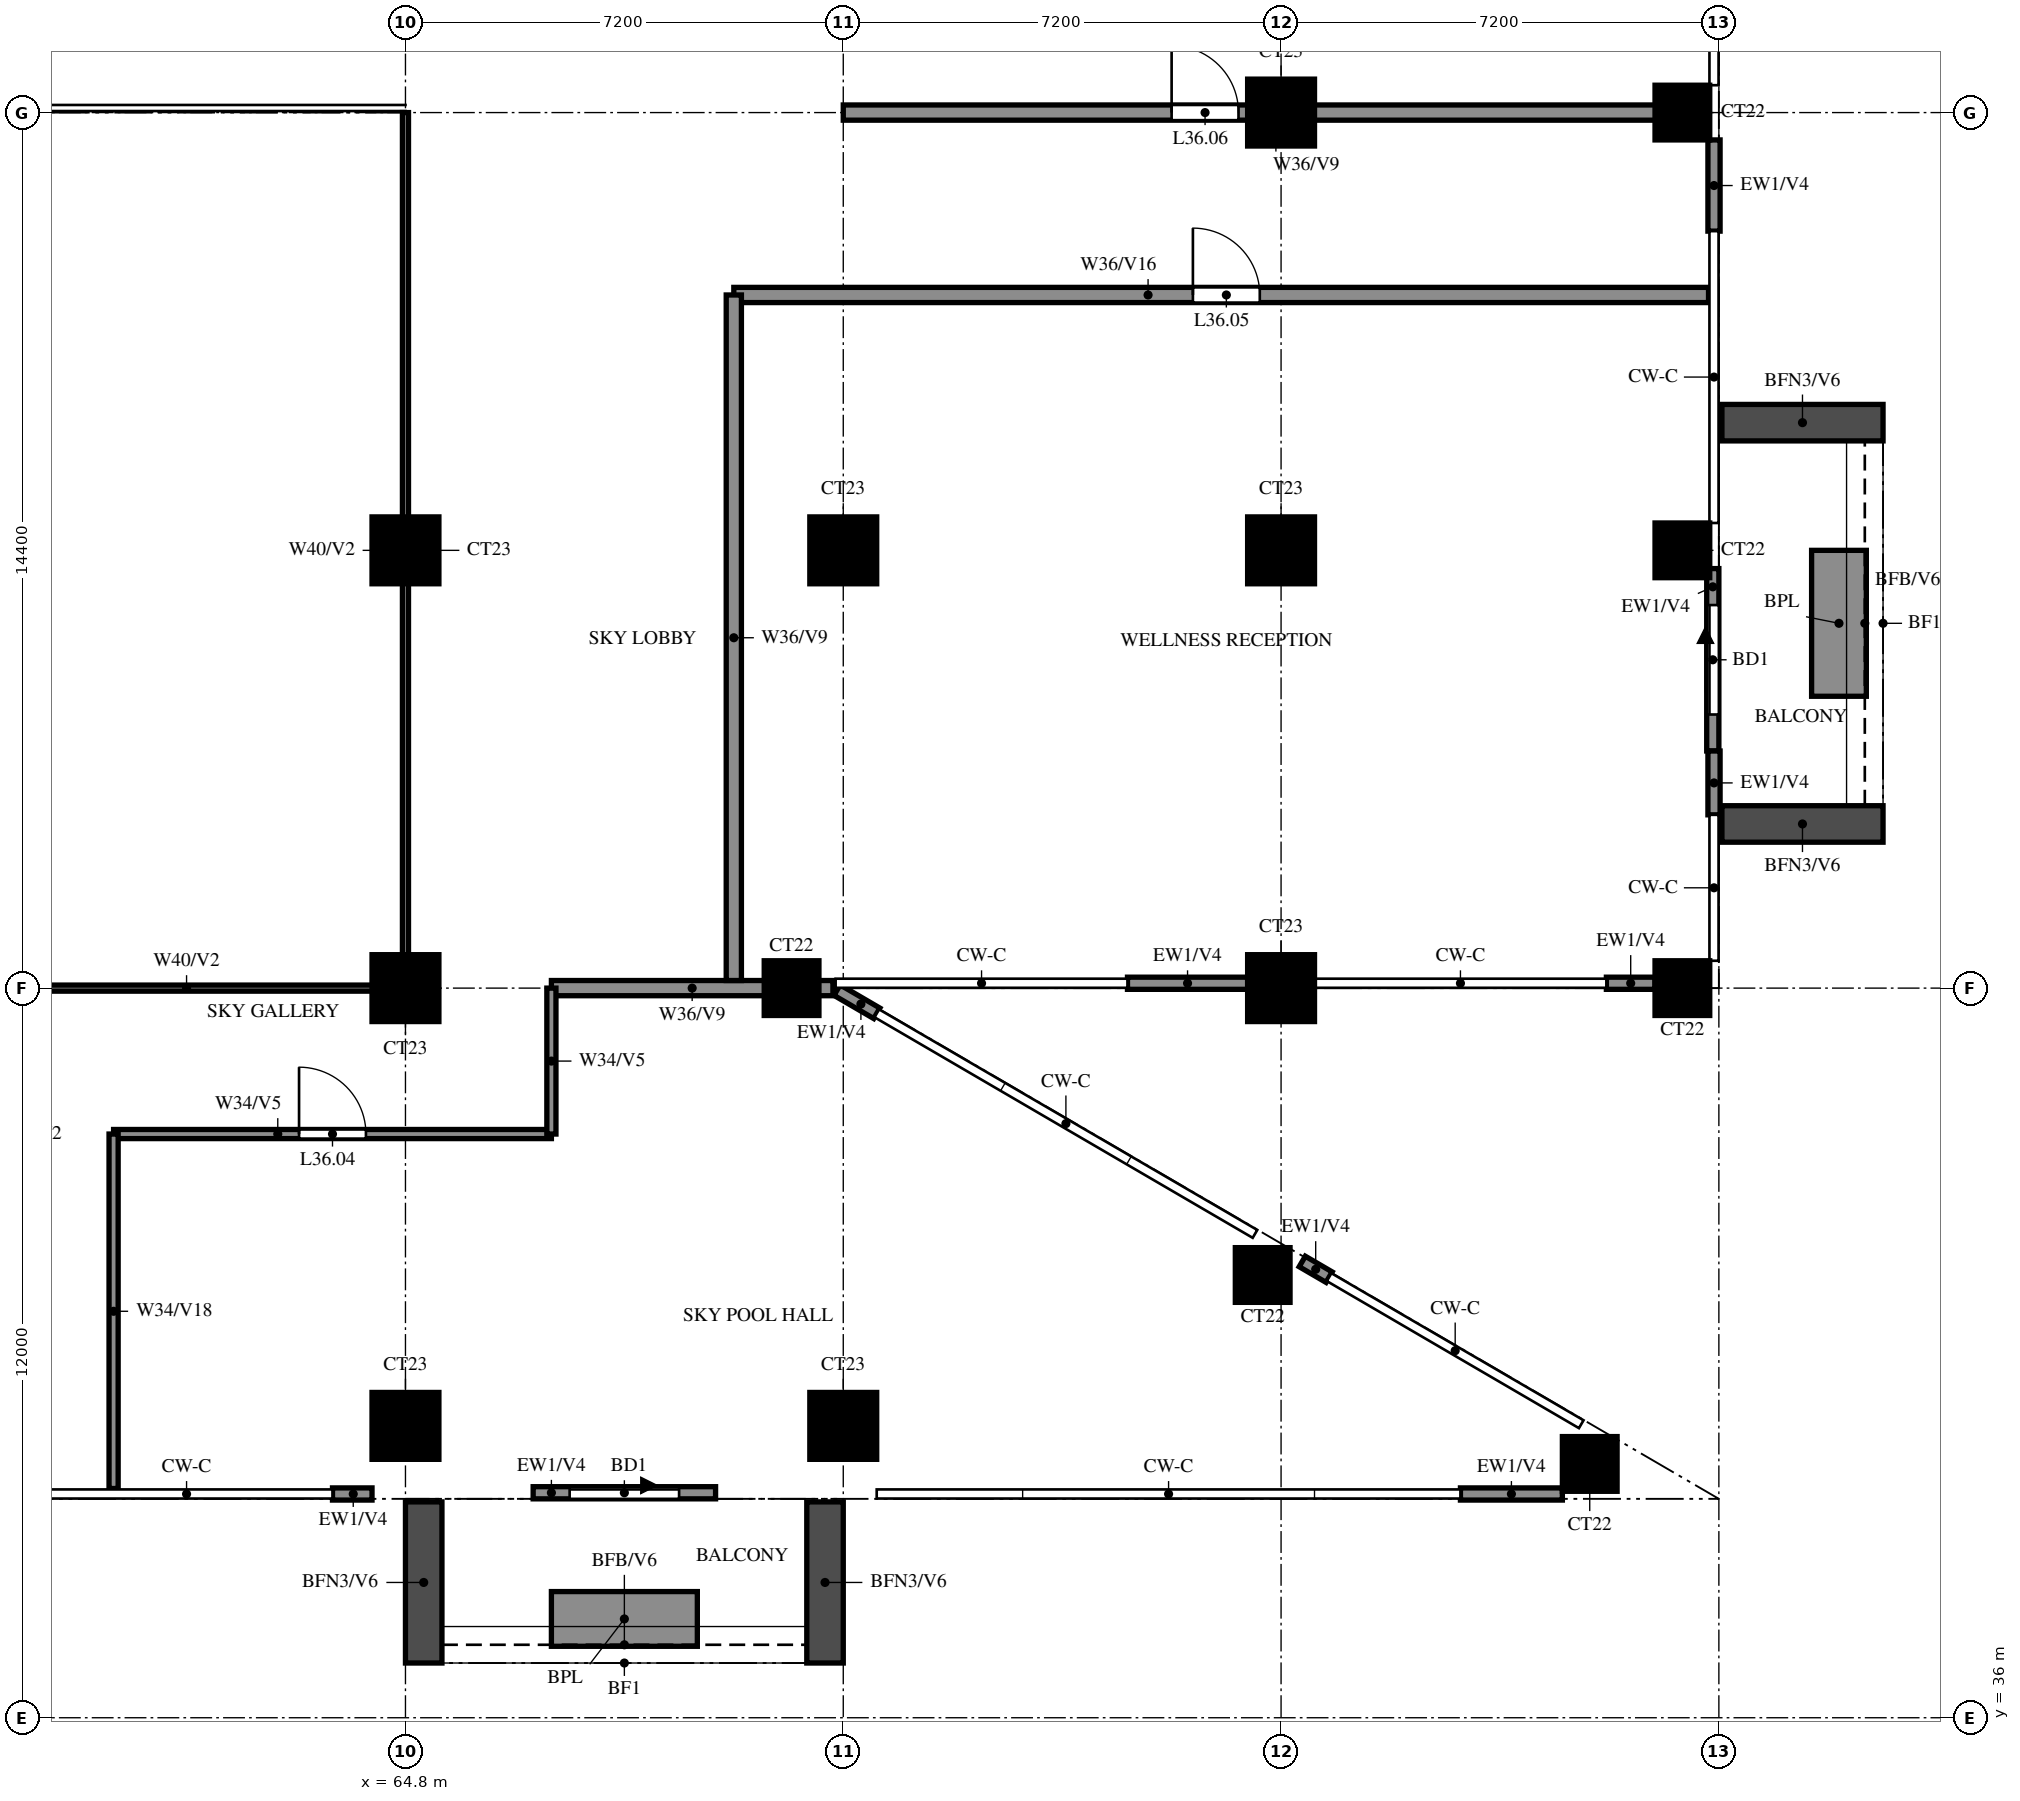
"""IFC4 building model, lengths in metres.
Left out: names, types, materials, properties, quantities, classifications, styles, units other than length and angle.
Written with IfcOpenShell. Run it as: python <this file> out.ifc"""

import sys

from ifc_helpers import new_model, si_unit, direction, frame, frame_2d, origin, origin_2d, place, context, subcontext, project, spatial, rectangle, extrude, source, transform, mapped, element, fill, save


model = new_model("IFC4")
c1 = context("Model", 3, precision=1e-05, world=origin(), true_north=direction((0.0, 1.0)))
c2 = subcontext(c1, "Body", "Model", "MODEL_VIEW")
j1 = project(units=[si_unit("LENGTHUNIT", "METRE"), si_unit("PLANEANGLEUNIT", "RADIAN")], contexts=[c1])
p1 = place(None, origin())
s1 = spatial("IfcSite", under=j1, at=p1, CompositionType="ELEMENT")
p2 = place(p1, origin())
s2 = spatial("IfcBuilding", under=s1, at=p2, CompositionType="ELEMENT")
p3 = place(p2, frame((0.0, 0.0, 137.5)))
s3 = spatial("IfcBuildingStorey", under=s2, at=p3, CompositionType="ELEMENT", Elevation=137.5)
m1 = source(origin(), c2, "Body", "SweptSolid", [
    extrude(rectangle(XDim=0.9, YDim=0.9, at=origin_2d()), origin(), (0.0, 0.0, 1.0), 5.2),
])
p4 = place(p3, frame((84.276, 40.174, 0.0), z_axis=(0.0, 0.0, 1.0), x_axis=(1.0, 0.0, 0.0)))
e1 = element("IfcColumn", 1, at=p4, inside=s3, PredefinedType="COLUMN", context=c2, shape_type="MappedRepresentation", body=[
    mapped(m1, transform((0.0, 0.0, 0.0))),
])
m2 = source(origin(), c2, "Body", "SweptSolid", [
    extrude(rectangle(XDim=1.1, YDim=1.1, at=origin_2d()), origin(), (0.0, 0.0, 1.0), 5.2),
])
for number, where, z_axis, x_axis in (
    (2, (64.8, 40.8, 0.0), (0.0, 0.0, 1.0), (1.0, 0.0, 0.0)),
    (3, (72.0, 40.8, 0.0), (0.0, 0.0, 1.0), (1.0, 0.0, 0.0)),
):
    element("IfcColumn", number, at=place(p3, frame(where, z_axis=z_axis, x_axis=x_axis)), inside=s3, PredefinedType="COLUMN", context=c2, shape_type="MappedRepresentation", body=[
        mapped(m2, transform((0.0, 0.0, 0.0))),
    ])
p5 = place(p3, frame((78.898, 43.282, 0.0), z_axis=(0.0, 0.0, 1.0), x_axis=(1.0, 0.0, 0.0)))
e4 = element("IfcColumn", 4, at=p5, inside=s3, PredefinedType="COLUMN", context=c2, shape_type="MappedRepresentation", body=[
    mapped(m1, transform((0.0, 0.0, 0.0))),
])
p6 = place(p3, frame((64.8, 48.0, 0.0), z_axis=(0.0, 0.0, 1.0), x_axis=(1.0, 0.0, 0.0)))
e5 = element("IfcColumn", 5, at=p6, inside=s3, PredefinedType="COLUMN", context=c2, shape_type="MappedRepresentation", body=[
    mapped(m2, transform((0.0, 0.0, 0.0))),
])
p7 = place(p3, frame((71.15, 48.0, 0.0), z_axis=(0.0, 0.0, 1.0), x_axis=(1.0, 0.0, 0.0)))
e6 = element("IfcColumn", 6, at=p7, inside=s3, PredefinedType="COLUMN", context=c2, shape_type="MappedRepresentation", body=[
    mapped(m1, transform((0.0, 0.0, 0.0))),
])
p8 = place(p3, frame((79.2, 48.0, 0.0), z_axis=(0.0, 0.0, 1.0), x_axis=(1.0, 0.0, 0.0)))
e7 = element("IfcColumn", 7, at=p8, inside=s3, PredefinedType="COLUMN", context=c2, shape_type="MappedRepresentation", body=[
    mapped(m2, transform((0.0, 0.0, 0.0))),
])
p9 = place(p3, frame((85.8, 48.0, 0.0), z_axis=(0.0, 0.0, 1.0), x_axis=(1.0, 0.0, 0.0)))
e8 = element("IfcColumn", 8, at=p9, inside=s3, PredefinedType="COLUMN", context=c2, shape_type="MappedRepresentation", body=[
    mapped(m1, transform((0.0, 0.0, 0.0))),
])
for number, where, z_axis, x_axis in (
    (9, (64.8, 55.2, 0.0), (0.0, 0.0, 1.0), (1.0, 0.0, 0.0)),
    (10, (72.0, 55.2, 0.0), (0.0, 0.0, 1.0), (1.0, 0.0, 0.0)),
    (11, (79.2, 55.2, 0.0), (0.0, 0.0, 1.0), (1.0, 0.0, 0.0)),
):
    element("IfcColumn", number, at=place(p3, frame(where, z_axis=z_axis, x_axis=x_axis)), inside=s3, PredefinedType="COLUMN", context=c2, shape_type="MappedRepresentation", body=[
        mapped(m2, transform((0.0, 0.0, 0.0))),
    ])
p10 = place(p3, frame((85.8, 55.2, 0.0), z_axis=(0.0, 0.0, 1.0), x_axis=(1.0, 0.0, 0.0)))
e12 = element("IfcColumn", 12, at=p10, inside=s3, PredefinedType="COLUMN", context=c2, shape_type="MappedRepresentation", body=[
    mapped(m1, transform((0.0, 0.0, 0.0))),
])
p11 = place(p3, frame((79.2, 62.4, 0.0), z_axis=(0.0, 0.0, 1.0), x_axis=(1.0, 0.0, 0.0)))
e13 = element("IfcColumn", 13, at=p11, inside=s3, PredefinedType="COLUMN", context=c2, shape_type="MappedRepresentation", body=[
    mapped(m2, transform((0.0, 0.0, 0.0))),
])
p12 = place(p3, frame((85.8, 62.4, 0.0), z_axis=(0.0, 0.0, 1.0), x_axis=(1.0, 0.0, 0.0)))
e14 = element("IfcColumn", 14, at=p12, inside=s3, PredefinedType="COLUMN", context=c2, shape_type="MappedRepresentation", body=[
    mapped(m1, transform((0.0, 0.0, 0.0))),
])
p13 = place(p3, frame((79.99, 43.246, 0.0), z_axis=(0.0, 0.0, 1.0), x_axis=(-0.863865392601, 0.503722724786, 0.0)))
e15 = element("IfcWall", 15, at=p13, inside=s3, PredefinedType="SOLIDWALL", context=c2, shape_type="SweptSolid", body=[
    extrude(rectangle(XDim=0.512, YDim=0.2, at=frame_2d((0.256, 0.0))), origin(), (0.0, 0.0, 1.0), 5.2),
])
p14 = place(p3, frame((72.552, 47.585, 0.0), z_axis=(0.0, 0.0, 1.0), x_axis=(-0.863743817622, 0.503931163473, 0.0)))
e16 = element("IfcWall", 16, at=p14, inside=s3, PredefinedType="SOLIDWALL", context=c2, shape_type="SweptSolid", body=[
    extrude(rectangle(XDim=0.757, YDim=0.2, at=frame_2d((0.379, 0.0))), origin(), (0.0, 0.0, 1.0), 5.2),
])
p15 = place(p3, frame((76.674, 48.08, 0.0), z_axis=(0.0, 0.0, 1.0), x_axis=(1.0, 0.0, 0.0)))
e17 = element("IfcWall", 17, at=p15, inside=s3, PredefinedType="SOLIDWALL", context=c2, shape_type="SweptSolid", body=[
    extrude(rectangle(XDim=1.976, YDim=0.2, at=frame_2d((0.988, 0.0))), origin(), (0.0, 0.0, 1.0), 5.2),
])
p16 = place(p3, frame((84.55, 48.08, 0.0), z_axis=(0.0, 0.0, 1.0), x_axis=(1.0, 0.0, 0.0)))
e18 = element("IfcWall", 18, at=p16, inside=s3, PredefinedType="SOLIDWALL", context=c2, shape_type="SweptSolid", body=[
    extrude(rectangle(XDim=0.8, YDim=0.2, at=frame_2d((0.4, 0.0))), origin(), (0.0, 0.0, 1.0), 5.2),
])
p17 = place(p3, frame((86.3, 51.9, 0.0), z_axis=(0.0, 0.0, 1.0), x_axis=(0.0, 1.0, 0.0)))
e19 = element("IfcWall", 19, at=p17, inside=s3, PredefinedType="SOLIDWALL", context=c2, shape_type="SweptSolid", body=[
    extrude(rectangle(XDim=3.0, YDim=0.2, at=frame_2d((1.5, 0.0))), origin(), (0.0, 0.0, 1.0), 5.2),
])
p18 = place(p17, frame((0.6, 0.0, 0.0)))
e20 = element("IfcOpeningElement", 20, at=p18, cuts=e19, PredefinedType="OPENING", context=c2, shape_type="SweptSolid", body=[
    extrude(rectangle(XDim=1.8, YDim=2.4, at=frame_2d((0.9, 1.2))), frame((0.0, 0.11, 0.0), z_axis=(0.0, -1.0, 0.0), x_axis=(1.0, 0.0, 0.0)), (0.0, 0.0, 1.0), 0.22),
])
p19 = place(p3, frame((86.32, 50.85, 0.0), z_axis=(0.0, 0.0, 1.0), x_axis=(0.0, 1.0, 0.0)))
e21 = element("IfcWall", 21, at=p19, inside=s3, PredefinedType="SOLIDWALL", context=c2, shape_type="SweptSolid", body=[
    extrude(rectangle(XDim=1.05, YDim=0.2, at=frame_2d((0.525, 0.0))), origin(), (0.0, 0.0, 1.0), 5.2),
])
p20 = place(p3, frame((86.32, 60.45, 0.0), z_axis=(0.0, 0.0, 1.0), x_axis=(0.0, 1.0, 0.0)))
e22 = element("IfcWall", 22, at=p20, inside=s3, PredefinedType="SOLIDWALL", context=c2, shape_type="SweptSolid", body=[
    extrude(rectangle(XDim=1.5, YDim=0.2, at=frame_2d((0.75, 0.0))), origin(), (0.0, 0.0, 1.0), 5.2),
])
p21 = place(p3, frame((66.9, 39.7, 0.0), z_axis=(0.0, 0.0, 1.0), x_axis=(1.0, 0.0, 0.0)))
e23 = element("IfcWall", 23, at=p21, inside=s3, PredefinedType="SOLIDWALL", context=c2, shape_type="SweptSolid", body=[
    extrude(rectangle(XDim=3.0, YDim=0.2, at=frame_2d((1.5, 0.0))), origin(), (0.0, 0.0, 1.0), 5.2),
])
p22 = place(p21, frame((0.6, 0.0, 0.0)))
e24 = element("IfcOpeningElement", 24, at=p22, cuts=e23, PredefinedType="OPENING", context=c2, shape_type="SweptSolid", body=[
    extrude(rectangle(XDim=1.8, YDim=2.4, at=frame_2d((0.9, 1.2))), frame((0.0, 0.11, 0.0), z_axis=(0.0, -1.0, 0.0), x_axis=(1.0, 0.0, 0.0)), (0.0, 0.0, 1.0), 0.22),
])
p23 = place(p3, frame((63.6, 39.68, 0.0), z_axis=(0.0, 0.0, 1.0), x_axis=(1.0, 0.0, 0.0)))
e25 = element("IfcWall", 25, at=p23, inside=s3, PredefinedType="SOLIDWALL", context=c2, shape_type="SweptSolid", body=[
    extrude(rectangle(XDim=0.65, YDim=0.2, at=frame_2d((0.325, 0.0))), origin(), (0.0, 0.0, 1.0), 5.2),
])
p24 = place(p3, frame((82.15, 39.68, 0.0), z_axis=(0.0, 0.0, 1.0), x_axis=(1.0, 0.0, 0.0)))
e26 = element("IfcWall", 26, at=p24, inside=s3, PredefinedType="SOLIDWALL", context=c2, shape_type="SweptSolid", body=[
    extrude(rectangle(XDim=1.676, YDim=0.2, at=frame_2d((0.838, 0.0))), origin(), (0.0, 0.0, 1.0), 5.2),
])
for number, where, z_axis, x_axis in (
    (27, (86.45, 50.7, 0.0), (0.0, 0.0, 1.0), (1.0, 0.0, 0.0)),
    (28, (86.45, 57.3, 0.0), (0.0, 0.0, 1.0), (1.0, 0.0, 0.0)),
):
    element("IfcWall", number, at=place(p3, frame(where, z_axis=z_axis, x_axis=x_axis)), inside=s3, PredefinedType="SOLIDWALL", context=c2, shape_type="SweptSolid", body=[
        extrude(rectangle(XDim=2.65, YDim=0.6, at=frame_2d((1.325, 0.0))), origin(), (0.0, 0.0, 1.0), 4.9),
    ])
p25 = place(p3, frame((88.375, 52.8, 0.0), z_axis=(0.0, 0.0, 1.0), x_axis=(0.0, 1.0, 0.0)))
e29 = element("IfcWall", 29, at=p25, inside=s3, PredefinedType="SOLIDWALL", context=c2, shape_type="SweptSolid", body=[
    extrude(rectangle(XDim=2.4, YDim=0.9, at=frame_2d((1.2, 0.0))), origin(), (0.0, 0.0, 1.0), 0.9),
])
for number, where, z_axis, x_axis in (
    (30, (65.1, 39.55, 0.0), (0.0, 0.0, 1.0), (0.0, -1.0, 0.0)),
    (31, (71.7, 39.55, 0.0), (0.0, 0.0, 1.0), (0.0, -1.0, 0.0)),
):
    element("IfcWall", number, at=place(p3, frame(where, z_axis=z_axis, x_axis=x_axis)), inside=s3, PredefinedType="SOLIDWALL", context=c2, shape_type="SweptSolid", body=[
        extrude(rectangle(XDim=2.65, YDim=0.6, at=frame_2d((1.325, 0.0))), origin(), (0.0, 0.0, 1.0), 4.9),
    ])
p26 = place(p3, frame((67.2, 37.625, 0.0), z_axis=(0.0, 0.0, 1.0), x_axis=(1.0, 0.0, 0.0)))
e32 = element("IfcWall", 32, at=p26, inside=s3, PredefinedType="SOLIDWALL", context=c2, shape_type="SweptSolid", body=[
    extrude(rectangle(XDim=2.4, YDim=0.9, at=frame_2d((1.2, 0.0))), origin(), (0.0, 0.0, 1.0), 0.9),
])
p27 = place(p3, frame((60.0, 45.6, 0.0), z_axis=(0.0, 0.0, 1.0), x_axis=(1.0, 0.0, 0.0)))
e33 = element("IfcWall", 33, at=p27, inside=s3, PredefinedType="PARTITIONING", context=c2, shape_type="SweptSolid", body=[
    extrude(rectangle(XDim=7.2, YDim=0.15, at=frame_2d((3.6, 0.0))), origin(), (0.0, 0.0, 1.0), 5.2),
])
p28 = place(p27, frame((3.05, 0.0, 0.0)))
e34 = element("IfcOpeningElement", 34, at=p28, cuts=e33, PredefinedType="OPENING", context=c2, shape_type="SweptSolid", body=[
    extrude(rectangle(XDim=1.1, YDim=2.1, at=frame_2d((0.55, 1.05))), frame((0.0, 0.085, 0.0), z_axis=(0.0, -1.0, 0.0), x_axis=(1.0, 0.0, 0.0)), (0.0, 0.0, 1.0), 0.17),
])
p29 = place(p3, frame((57.6, 48.0, 0.0), z_axis=(0.0, 0.0, 1.0), x_axis=(1.0, 0.0, 0.0)))
e35 = element("IfcWall", 35, at=p29, inside=s3, PredefinedType="PARTITIONING", context=c2, shape_type="SweptSolid", body=[
    extrude(rectangle(XDim=7.2, YDim=0.1, at=frame_2d((3.6, 0.0))), origin(), (0.0, 0.0, 1.0), 4.3),
])
p30 = place(p3, frame((67.2, 48.0, 0.0), z_axis=(0.0, 0.0, 1.0), x_axis=(1.0, 0.0, 0.0)))
e36 = element("IfcWall", 36, at=p30, inside=s3, PredefinedType="SOLIDWALL", context=c2, shape_type="SweptSolid", body=[
    extrude(rectangle(XDim=4.63, YDim=0.25, at=frame_2d((2.315, 0.0))), origin(), (0.0, 0.0, 1.0), 5.2),
])
p31 = place(p3, frame((70.2, 59.4, 0.0), z_axis=(0.0, 0.0, 1.0), x_axis=(1.0, 0.0, 0.0)))
e37 = element("IfcWall", 37, at=p31, inside=s3, PredefinedType="SOLIDWALL", context=c2, shape_type="SweptSolid", body=[
    extrude(rectangle(XDim=16.03, YDim=0.25, at=frame_2d((8.015, 0.0))), origin(), (0.0, 0.0, 1.0), 4.3),
])
p32 = place(p31, frame((7.55, 0.0, 0.0)))
e38 = element("IfcOpeningElement", 38, at=p32, cuts=e37, PredefinedType="OPENING", context=c2, shape_type="SweptSolid", body=[
    extrude(rectangle(XDim=1.1, YDim=2.1, at=frame_2d((0.55, 1.05))), frame((0.0, 0.135, 0.0), z_axis=(0.0, -1.0, 0.0), x_axis=(1.0, 0.0, 0.0)), (0.0, 0.0, 1.0), 0.27),
])
p33 = place(p3, frame((72.0, 62.4, 0.0), z_axis=(0.0, 0.0, 1.0), x_axis=(1.0, 0.0, 0.0)))
e39 = element("IfcWall", 39, at=p33, inside=s3, PredefinedType="SOLIDWALL", context=c2, shape_type="SweptSolid", body=[
    extrude(rectangle(XDim=14.23, YDim=0.25, at=frame_2d((7.115, 0.0))), origin(), (0.0, 0.0, 1.0), 5.2),
])
p34 = place(p33, frame((5.4, 0.0, 0.0)))
e40 = element("IfcOpeningElement", 40, at=p34, cuts=e39, PredefinedType="OPENING", context=c2, shape_type="SweptSolid", body=[
    extrude(rectangle(XDim=1.1, YDim=2.1, at=frame_2d((0.55, 1.05))), frame((0.0, 0.135, 0.0), z_axis=(0.0, -1.0, 0.0), x_axis=(1.0, 0.0, 0.0)), (0.0, 0.0, 1.0), 0.27),
])
p35 = place(p3, frame((60.0, 39.77, 0.0), z_axis=(0.0, 0.0, 1.0), x_axis=(0.0, 1.0, 0.0)))
e41 = element("IfcWall", 41, at=p35, inside=s3, PredefinedType="PARTITIONING", context=c2, shape_type="SweptSolid", body=[
    extrude(rectangle(XDim=5.83, YDim=0.15, at=frame_2d((2.915, 0.0))), origin(), (0.0, 0.0, 1.0), 4.0),
])
p36 = place(p3, frame((64.8, 48.0, 0.0), z_axis=(0.0, 0.0, 1.0), x_axis=(0.0, 1.0, 0.0)))
e42 = element("IfcWall", 42, at=p36, inside=s3, PredefinedType="PARTITIONING", context=c2, shape_type="SweptSolid", body=[
    extrude(rectangle(XDim=14.4, YDim=0.1, at=frame_2d((7.2, 0.0))), origin(), (0.0, 0.0, 1.0), 4.3),
])
p37 = place(p3, frame((67.2, 45.6, 0.0), z_axis=(0.0, 0.0, 1.0), x_axis=(0.0, 1.0, 0.0)))
e43 = element("IfcWall", 43, at=p37, inside=s3, PredefinedType="PARTITIONING", context=c2, shape_type="SweptSolid", body=[
    extrude(rectangle(XDim=2.4, YDim=0.15, at=frame_2d((1.2, 0.0))), origin(), (0.0, 0.0, 1.0), 5.2),
])
p38 = place(p3, frame((70.2, 48.125, 0.0), z_axis=(0.0, 0.0, 1.0), x_axis=(0.0, 1.0, 0.0)))
e44 = element("IfcWall", 44, at=p38, inside=s3, PredefinedType="SOLIDWALL", context=c2, shape_type="SweptSolid", body=[
    extrude(rectangle(XDim=11.275, YDim=0.25, at=frame_2d((5.637, 0.0))), origin(), (0.0, 0.0, 1.0), 5.2),
])
p39 = place(p18, origin())
e45 = element("IfcDoor", 45, at=p39, inside=s3, OperationType="DOUBLE_DOOR_SLIDING", PredefinedType="DOOR", context=c2, shape_type="SweptSolid", body=[
    extrude(rectangle(XDim=1.8, YDim=2.4, at=frame_2d((0.9, 1.2))), frame((0.0, 0.025, 0.0), z_axis=(0.0, -1.0, 0.0), x_axis=(1.0, 0.0, 0.0)), (0.0, 0.0, 1.0), 0.05),
])
fill(e20, e45)
p40 = place(p22, origin())
e46 = element("IfcDoor", 46, at=p40, inside=s3, OperationType="DOUBLE_DOOR_SLIDING", PredefinedType="DOOR", context=c2, shape_type="SweptSolid", body=[
    extrude(rectangle(XDim=1.8, YDim=2.4, at=frame_2d((0.9, 1.2))), frame((0.0, 0.025, 0.0), z_axis=(0.0, -1.0, 0.0), x_axis=(1.0, 0.0, 0.0)), (0.0, 0.0, 1.0), 0.05),
])
fill(e24, e46)
p41 = place(p28, origin())
e47 = element("IfcDoor", 47, at=p41, inside=s3, OperationType="SINGLE_SWING_RIGHT", PredefinedType="DOOR", context=c2, shape_type="SweptSolid", body=[
    extrude(rectangle(XDim=1.1, YDim=2.1, at=frame_2d((0.55, 1.05))), frame((0.0, 0.025, 0.0), z_axis=(0.0, -1.0, 0.0), x_axis=(1.0, 0.0, 0.0)), (0.0, 0.0, 1.0), 0.05),
])
fill(e34, e47)
p42 = place(p32, origin())
e48 = element("IfcDoor", 48, at=p42, inside=s3, OperationType="SINGLE_SWING_RIGHT", PredefinedType="DOOR", context=c2, shape_type="SweptSolid", body=[
    extrude(rectangle(XDim=1.1, YDim=2.1, at=frame_2d((0.55, 1.05))), frame((0.0, 0.025, 0.0), z_axis=(0.0, -1.0, 0.0), x_axis=(1.0, 0.0, 0.0)), (0.0, 0.0, 1.0), 0.05),
])
fill(e38, e48)
p43 = place(p34, origin())
e49 = element("IfcDoor", 49, at=p43, inside=s3, OperationType="SINGLE_SWING_LEFT", PredefinedType="DOOR", context=c2, shape_type="SweptSolid", body=[
    extrude(rectangle(XDim=1.1, YDim=2.1, at=frame_2d((0.55, 1.05))), frame((0.0, 0.025, 0.0), z_axis=(0.0, -1.0, 0.0), x_axis=(1.0, 0.0, 0.0)), (0.0, 0.0, 1.0), 0.05),
])
fill(e40, e49)
save(model, sys.argv[1])
